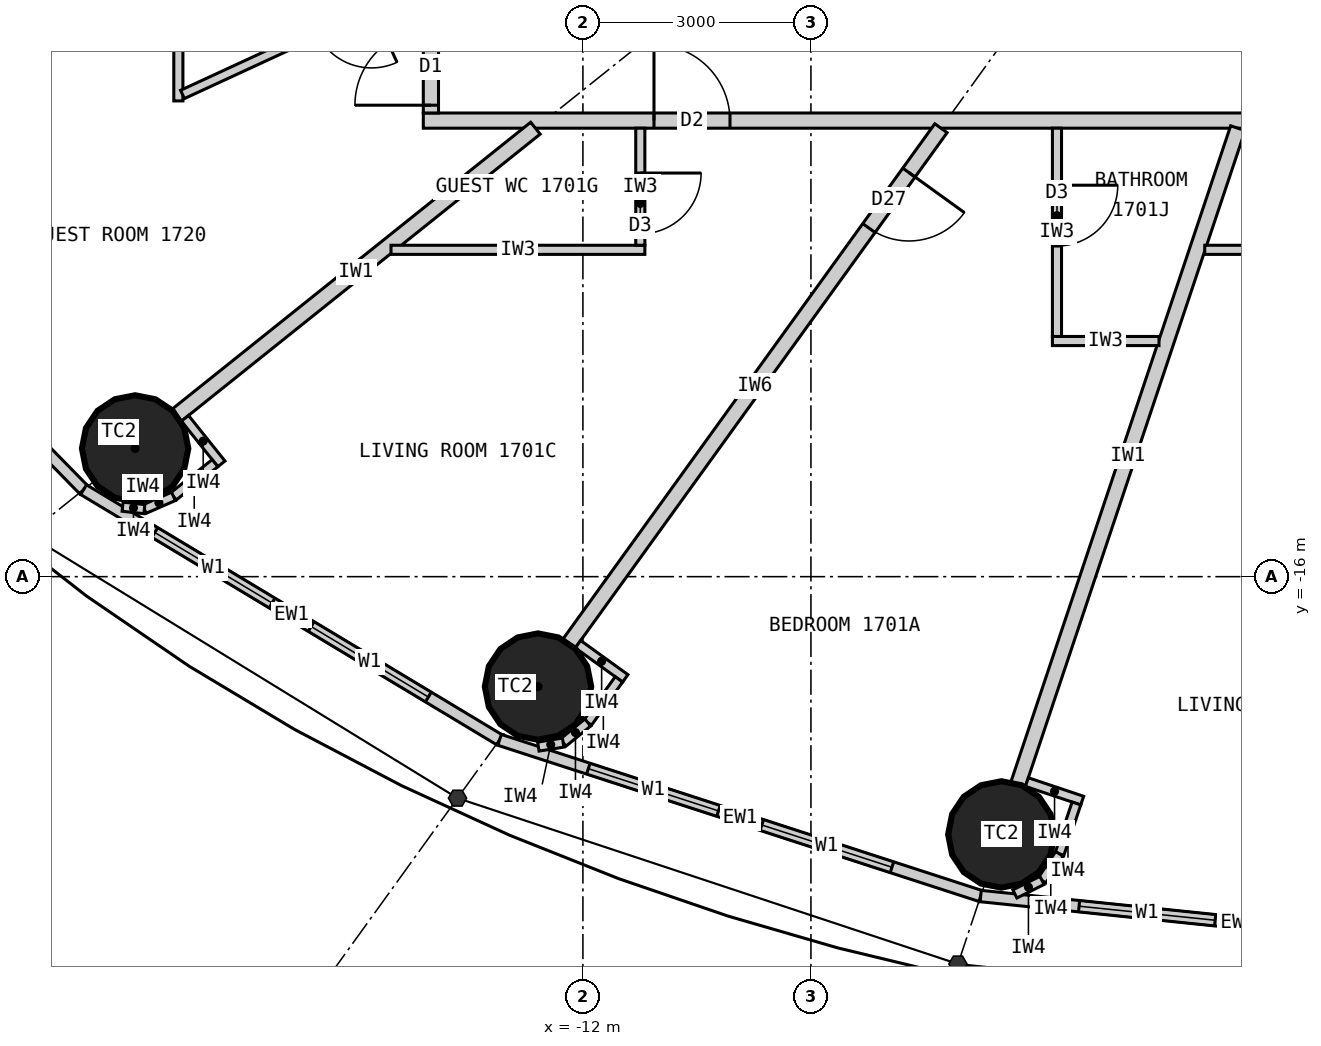
"""IFC4 building model, lengths in metres.
Left out: names, types, materials, properties, quantities, classifications, styles, units other than length and angle.
Written with IfcOpenShell. Run it as: python <this file> out.ifc"""

import sys

from ifc_helpers import new_model, si_unit, direction, frame, frame_2d, origin, origin_2d, place, context, subcontext, project, spatial, rectangle, circle, extrude, element, fill, save


model = new_model("IFC4")
c1 = context("Model", 3, precision=1e-05, world=origin(), true_north=direction((0.0, 1.0)))
c2 = subcontext(c1, "Body", "Model", "MODEL_VIEW")
j1 = project(units=[si_unit("LENGTHUNIT", "METRE"), si_unit("PLANEANGLEUNIT", "RADIAN")], contexts=[c1])
p1 = place(None, origin())
s1 = spatial("IfcSite", under=j1, at=p1, CompositionType="ELEMENT")
p2 = place(p1, origin())
s2 = spatial("IfcBuilding", under=s1, at=p2, CompositionType="ELEMENT")
p3 = place(p2, frame((0.0, 0.0, 70.5)))
s3 = spatial("IfcBuildingStorey", under=s2, at=p3, CompositionType="ELEMENT", Elevation=70.5)
for number, where, z_axis, x_axis in (
    (1, (-17.892, -14.313, 0.0), (0.0, 0.0, 1.0), (1.0, 0.0, 0.0)),
    (2, (-12.591, -17.447, 0.0), (0.0, 0.0, 1.0), (1.0, 0.0, 0.0)),
    (3, (-6.495, -19.391, 0.0), (0.0, 0.0, 1.0), (1.0, 0.0, 0.0)),
):
    element("IfcColumn", number, at=place(p3, frame(where, z_axis=z_axis, x_axis=x_axis)), inside=s3, PredefinedType="COLUMN", context=c2, shape_type="SweptSolid", body=[
        extrude(circle(Radius=0.7, at=origin_2d()), origin(), (0.0, 0.0, 1.0), 3.3),
    ])
p4 = place(p3, frame((-22.803, -10.532, 0.0), z_axis=(0.0, 0.0, 1.0), x_axis=(0.699602905915, -0.714531856557, 0.0)))
e4 = element("IfcWall", 4, at=p4, inside=s3, PredefinedType="ELEMENTEDWALL", context=c2, shape_type="SweptSolid", body=[
    extrude(rectangle(XDim=6.051, YDim=0.15, at=frame_2d((3.025, 0.0))), origin(), (0.0, 0.0, 1.0), 3.12),
])
p5 = place(p4, frame((0.926, 0.0, 0.9)))
e5 = element("IfcOpeningElement", 5, at=p5, cuts=e4, PredefinedType="OPENING", context=c2, shape_type="SweptSolid", body=[
    extrude(rectangle(XDim=1.8, YDim=1.9, at=frame_2d((0.9, 0.95))), frame((0.0, 0.085, 0.0), z_axis=(0.0, -1.0, 0.0), x_axis=(1.0, 0.0, 0.0)), (0.0, 0.0, 1.0), 0.17),
])
p6 = place(p4, frame((3.325, 0.0, 0.9)))
e6 = element("IfcOpeningElement", 6, at=p6, cuts=e4, PredefinedType="OPENING", context=c2, shape_type="SweptSolid", body=[
    extrude(rectangle(XDim=1.8, YDim=1.9, at=frame_2d((0.9, 0.95))), frame((0.0, 0.085, 0.0), z_axis=(0.0, -1.0, 0.0), x_axis=(1.0, 0.0, 0.0)), (0.0, 0.0, 1.0), 0.17),
])
p7 = place(p3, frame((-18.57, -14.856, 0.0), z_axis=(0.0, 0.0, 1.0), x_axis=(0.856983180864, -0.515344377787, 0.0)))
e7 = element("IfcWall", 7, at=p7, inside=s3, PredefinedType="ELEMENTEDWALL", context=c2, shape_type="SweptSolid", body=[
    extrude(rectangle(XDim=6.386, YDim=0.15, at=frame_2d((3.193, 0.0))), origin(), (0.0, 0.0, 1.0), 3.12),
])
p8 = place(p7, frame((1.093, 0.0, 0.9)))
e8 = element("IfcOpeningElement", 8, at=p8, cuts=e7, PredefinedType="OPENING", context=c2, shape_type="SweptSolid", body=[
    extrude(rectangle(XDim=1.8, YDim=1.9, at=frame_2d((0.9, 0.95))), frame((0.0, 0.085, 0.0), z_axis=(0.0, -1.0, 0.0), x_axis=(1.0, 0.0, 0.0)), (0.0, 0.0, 1.0), 0.17),
])
p9 = place(p7, frame((3.493, 0.0, 0.9)))
e9 = element("IfcOpeningElement", 9, at=p9, cuts=e7, PredefinedType="OPENING", context=c2, shape_type="SweptSolid", body=[
    extrude(rectangle(XDim=1.8, YDim=1.9, at=frame_2d((0.9, 0.95))), frame((0.0, 0.085, 0.0), z_axis=(0.0, -1.0, 0.0), x_axis=(1.0, 0.0, 0.0)), (0.0, 0.0, 1.0), 0.17),
])
p10 = place(p3, frame((-13.096, -18.147, 0.0), z_axis=(0.0, 0.0, 1.0), x_axis=(0.951137534625, -0.308767534285, 0.0)))
e10 = element("IfcWall", 10, at=p10, inside=s3, PredefinedType="ELEMENTEDWALL", context=c2, shape_type="SweptSolid", body=[
    extrude(rectangle(XDim=6.655, YDim=0.15, at=frame_2d((3.328, 0.0))), origin(), (0.0, 0.0, 1.0), 3.12),
])
p11 = place(p10, frame((1.228, 0.0, 0.9)))
e11 = element("IfcOpeningElement", 11, at=p11, cuts=e10, PredefinedType="OPENING", context=c2, shape_type="SweptSolid", body=[
    extrude(rectangle(XDim=1.8, YDim=1.9, at=frame_2d((0.9, 0.95))), frame((0.0, 0.085, 0.0), z_axis=(0.0, -1.0, 0.0), x_axis=(1.0, 0.0, 0.0)), (0.0, 0.0, 1.0), 0.17),
])
p12 = place(p10, frame((3.628, 0.0, 0.9)))
e12 = element("IfcOpeningElement", 12, at=p12, cuts=e10, PredefinedType="OPENING", context=c2, shape_type="SweptSolid", body=[
    extrude(rectangle(XDim=1.8, YDim=1.9, at=frame_2d((0.9, 0.95))), frame((0.0, 0.085, 0.0), z_axis=(0.0, -1.0, 0.0), x_axis=(1.0, 0.0, 0.0)), (0.0, 0.0, 1.0), 0.17),
])
p13 = place(p3, frame((-6.766, -20.202, 0.0), z_axis=(0.0, 0.0, 1.0), x_axis=(0.994721394369, -0.102612609291, 0.0)))
e13 = element("IfcWall", 13, at=p13, inside=s3, PredefinedType="ELEMENTEDWALL", context=c2, shape_type="SweptSolid", body=[
    extrude(rectangle(XDim=6.802, YDim=0.15, at=frame_2d((3.401, 0.0))), origin(), (0.0, 0.0, 1.0), 3.12),
])
p14 = place(p13, frame((1.301, 0.0, 0.9)))
e14 = element("IfcOpeningElement", 14, at=p14, cuts=e13, PredefinedType="OPENING", context=c2, shape_type="SweptSolid", body=[
    extrude(rectangle(XDim=1.8, YDim=1.9, at=frame_2d((0.9, 0.95))), frame((0.0, 0.085, 0.0), z_axis=(0.0, -1.0, 0.0), x_axis=(1.0, 0.0, 0.0)), (0.0, 0.0, 1.0), 0.17),
])
p15 = place(p13, frame((3.701, 0.0, 0.9)))
e15 = element("IfcOpeningElement", 15, at=p15, cuts=e13, PredefinedType="OPENING", context=c2, shape_type="SweptSolid", body=[
    extrude(rectangle(XDim=1.8, YDim=1.9, at=frame_2d((0.9, 0.95))), frame((0.0, 0.085, 0.0), z_axis=(0.0, -1.0, 0.0), x_axis=(1.0, 0.0, 0.0)), (0.0, 0.0, 1.0), 0.17),
])
p16 = place(p3, frame((14.1, -10.0, 0.0), z_axis=(0.0, 0.0, 1.0), x_axis=(-1.0, 0.0, 0.0)))
e16 = element("IfcWall", 16, at=p16, inside=s3, PredefinedType="PARTITIONING", context=c2, shape_type="SweptSolid", body=[
    extrude(rectangle(XDim=28.2, YDim=0.2, at=frame_2d((14.1, 0.0))), origin(), (0.0, 0.0, 1.0), 3.12),
])
p17 = place(p16, frame((24.165, 0.0, 0.0)))
e17 = element("IfcOpeningElement", 17, at=p17, cuts=e16, PredefinedType="OPENING", context=c2, shape_type="SweptSolid", body=[
    extrude(rectangle(XDim=1.0, YDim=2.2, at=frame_2d((0.5, 1.1))), frame((0.0, 0.11, 0.0), z_axis=(0.0, -1.0, 0.0), x_axis=(1.0, 0.0, 0.0)), (0.0, 0.0, 1.0), 0.22),
])
p18 = place(p16, frame((14.923, 0.0, 0.0)))
e18 = element("IfcOpeningElement", 18, at=p18, cuts=e16, PredefinedType="OPENING", context=c2, shape_type="SweptSolid", body=[
    extrude(rectangle(XDim=1.0, YDim=2.2, at=frame_2d((0.5, 1.1))), frame((0.0, 0.11, 0.0), z_axis=(0.0, -1.0, 0.0), x_axis=(1.0, 0.0, 0.0)), (0.0, 0.0, 1.0), 0.22),
])
p19 = place(p16, frame((3.035, 0.0, 0.0)))
e19 = element("IfcOpeningElement", 19, at=p19, cuts=e16, PredefinedType="OPENING", context=c2, shape_type="SweptSolid", body=[
    extrude(rectangle(XDim=1.0, YDim=2.2, at=frame_2d((0.5, 1.1))), frame((0.0, 0.11, 0.0), z_axis=(0.0, -1.0, 0.0), x_axis=(1.0, 0.0, 0.0)), (0.0, 0.0, 1.0), 0.22),
])
p20 = place(p3, frame((-14.1, -6.512, 0.0), z_axis=(0.0, 0.0, 1.0), x_axis=(-0.907832871056, -0.419332181247, 0.0)))
e20 = element("IfcWall", 20, at=p20, inside=s3, PredefinedType="PARTITIONING", context=c2, shape_type="SweptSolid", body=[
    extrude(rectangle(XDim=8.023, YDim=0.2, at=frame_2d((4.011, 0.0))), origin(), (0.0, 0.0, 1.0), 2.32),
])
p21 = place(p3, frame((-12.625, -10.1, 0.0), z_axis=(0.0, 0.0, 1.0), x_axis=(-0.780892451574, -0.624665493744, 0.0)))
e21 = element("IfcWall", 21, at=p21, inside=s3, PredefinedType="PARTITIONING", context=c2, shape_type="SweptSolid", body=[
    extrude(rectangle(XDim=6.045, YDim=0.2, at=frame_2d((3.022, 0.0))), origin(), (0.0, 0.0, 1.0), 2.32),
])
p22 = place(p3, frame((-7.289, -10.1, 0.0), z_axis=(0.0, 0.0, 1.0), x_axis=(-0.585198353053, -0.810890182197, 0.0)))
e22 = element("IfcWall", 22, at=p22, inside=s3, PredefinedType="PARTITIONING", context=c2, shape_type="SweptSolid", body=[
    extrude(rectangle(XDim=8.36, YDim=0.2, at=frame_2d((4.18, 0.0))), origin(), (0.0, 0.0, 1.0), 2.32),
])
p23 = place(p22, frame((0.72, 0.0, 0.0)))
e23 = element("IfcOpeningElement", 23, at=p23, cuts=e22, PredefinedType="OPENING", context=c2, shape_type="SweptSolid", body=[
    extrude(rectangle(XDim=0.9, YDim=2.1, at=frame_2d((0.45, 1.05))), frame((0.0, 0.11, 0.0), z_axis=(0.0, -1.0, 0.0), x_axis=(1.0, 0.0, 0.0)), (0.0, 0.0, 1.0), 0.22),
])
p24 = place(p3, frame((-3.383, -10.1, 0.0), z_axis=(0.0, 0.0, 1.0), x_axis=(-0.31759592231, -0.948226149256, 0.0)))
e24 = element("IfcWall", 24, at=p24, inside=s3, PredefinedType="PARTITIONING", context=c2, shape_type="SweptSolid", body=[
    extrude(rectangle(XDim=9.098, YDim=0.2, at=frame_2d((4.549, 0.0))), origin(), (0.0, 0.0, 1.0), 2.32),
])
p25 = place(p3, frame((-14.525, -11.7, 0.0), z_axis=(0.0, 0.0, 1.0), x_axis=(1.0, 0.0, 0.0)))
e25 = element("IfcWall", 25, at=p25, inside=s3, PredefinedType="PARTITIONING", context=c2, shape_type="SweptSolid", body=[
    extrude(rectangle(XDim=3.34, YDim=0.12, at=frame_2d((1.67, 0.0))), origin(), (0.0, 0.0, 1.0), 3.12),
])
p26 = place(p3, frame((-11.245, -10.1, 0.0), z_axis=(0.0, 0.0, 1.0), x_axis=(0.0, -1.0, 0.0)))
e26 = element("IfcWall", 26, at=p26, inside=s3, PredefinedType="PARTITIONING", context=c2, shape_type="SweptSolid", body=[
    extrude(rectangle(XDim=1.54, YDim=0.12, at=frame_2d((0.77, 0.0))), origin(), (0.0, 0.0, 1.0), 3.12),
])
p27 = place(p26, frame((0.59, 0.0, 0.0)))
e27 = element("IfcOpeningElement", 27, at=p27, cuts=e26, PredefinedType="OPENING", context=c2, shape_type="SweptSolid", body=[
    extrude(rectangle(XDim=0.8, YDim=2.1, at=frame_2d((0.4, 1.05))), frame((0.0, 0.07, 0.0), z_axis=(0.0, -1.0, 0.0), x_axis=(1.0, 0.0, 0.0)), (0.0, 0.0, 1.0), 0.14),
])
p28 = place(p3, frame((-4.421, -12.9, 0.0), z_axis=(0.0, 0.0, 1.0), x_axis=(-1.0, 0.0, 0.0)))
e28 = element("IfcWall", 28, at=p28, inside=s3, PredefinedType="PARTITIONING", context=c2, shape_type="SweptSolid", body=[
    extrude(rectangle(XDim=1.402, YDim=0.12, at=frame_2d((0.701, 0.0))), origin(), (0.0, 0.0, 1.0), 3.12),
])
p29 = place(p3, frame((-5.763, -10.1, 0.0), z_axis=(0.0, 0.0, 1.0), x_axis=(0.0, -1.0, 0.0)))
e29 = element("IfcWall", 29, at=p29, inside=s3, PredefinedType="PARTITIONING", context=c2, shape_type="SweptSolid", body=[
    extrude(rectangle(XDim=2.74, YDim=0.12, at=frame_2d((1.37, 0.0))), origin(), (0.0, 0.0, 1.0), 3.12),
])
p30 = place(p29, frame((0.75, 0.0, 0.0)))
e30 = element("IfcOpeningElement", 30, at=p30, cuts=e29, PredefinedType="OPENING", context=c2, shape_type="SweptSolid", body=[
    extrude(rectangle(XDim=0.8, YDim=2.1, at=frame_2d((0.4, 1.05))), frame((0.0, 0.07, 0.0), z_axis=(0.0, -1.0, 0.0), x_axis=(1.0, 0.0, 0.0)), (0.0, 0.0, 1.0), 0.14),
])
p31 = place(p3, frame((-3.819, -11.7, 0.0), z_axis=(0.0, 0.0, 1.0), x_axis=(1.0, 0.0, 0.0)))
e31 = element("IfcWall", 31, at=p31, inside=s3, PredefinedType="PARTITIONING", context=c2, shape_type="SweptSolid", body=[
    extrude(rectangle(XDim=1.876, YDim=0.12, at=frame_2d((0.938, 0.0))), origin(), (0.0, 0.0, 1.0), 3.12),
])
p32 = place(p3, frame((-17.323, -8.101, 0.0), z_axis=(0.0, 0.0, 1.0), x_axis=(0.0, -1.0, 0.0)))
e32 = element("IfcWall", 32, at=p32, inside=s3, PredefinedType="PARTITIONING", context=c2, shape_type="SweptSolid", body=[
    extrude(rectangle(XDim=1.64, YDim=0.12, at=frame_2d((0.82, 0.0))), origin(), (0.0, 0.0, 1.0), 3.12),
])
p33 = place(p3, frame((-14.1, -8.193, 0.0), z_axis=(0.0, 0.0, 1.0), x_axis=(-0.907836493557, -0.419324338628, 0.0)))
e33 = element("IfcWall", 33, at=p33, inside=s3, PredefinedType="PARTITIONING", context=c2, shape_type="SweptSolid", body=[
    extrude(rectangle(XDim=3.49, YDim=0.12, at=frame_2d((1.745, 0.0))), origin(), (0.0, 0.0, 1.0), 3.12),
])
p34 = place(p33, frame((0.75, 0.0, 0.0)))
e34 = element("IfcOpeningElement", 34, at=p34, cuts=e33, PredefinedType="OPENING", context=c2, shape_type="SweptSolid", body=[
    extrude(rectangle(XDim=0.8, YDim=2.1, at=frame_2d((0.4, 1.05))), frame((0.0, 0.07, 0.0), z_axis=(0.0, -1.0, 0.0), x_axis=(1.0, 0.0, 0.0)), (0.0, 0.0, 1.0), 0.14),
])
p35 = place(p3, frame((-14.0, -4.772, 0.0), z_axis=(0.0, 0.0, 1.0), x_axis=(0.0, -1.0, 0.0)))
e35 = element("IfcWall", 35, at=p35, inside=s3, PredefinedType="PARTITIONING", context=c2, shape_type="SweptSolid", body=[
    extrude(rectangle(XDim=5.127, YDim=0.2, at=frame_2d((2.564, 0.0))), origin(), (0.0, 0.0, 1.0), 3.12),
])
p36 = place(p35, frame((4.025, 0.0, 0.0)))
e36 = element("IfcOpeningElement", 36, at=p36, cuts=e35, PredefinedType="OPENING", context=c2, shape_type="SweptSolid", body=[
    extrude(rectangle(XDim=1.0, YDim=2.2, at=frame_2d((0.5, 1.1))), frame((0.0, 0.11, 0.0), z_axis=(0.0, -1.0, 0.0), x_axis=(1.0, 0.0, 0.0)), (0.0, 0.0, 1.0), 0.22),
])
p37 = place(p3, frame((-17.236, -13.917, 0.0), z_axis=(0.0, 0.0, 1.0), x_axis=(0.624695047554, -0.780868809443, 0.0)))
e37 = element("IfcWall", 37, at=p37, inside=s3, PredefinedType="PARTITIONING", context=c2, shape_type="SweptSolid", body=[
    extrude(rectangle(XDim=0.768, YDim=0.12, at=frame_2d((0.384, 0.0))), origin(), (0.0, 0.0, 1.0), 3.12),
])
p38 = place(p3, frame((-16.841, -14.507, 0.0), z_axis=(0.0, 0.0, 1.0), x_axis=(-0.780902834923, -0.62465251333, 0.0)))
e38 = element("IfcWall", 38, at=p38, inside=s3, PredefinedType="PARTITIONING", context=c2, shape_type="SweptSolid", body=[
    extrude(rectangle(XDim=0.7, YDim=0.12, at=frame_2d((0.35, 0.0))), origin(), (0.0, 0.0, 1.0), 3.12),
])
p39 = place(p3, frame((-17.387, -14.944, 0.0), z_axis=(0.0, 0.0, 1.0), x_axis=(-0.916036698064, -0.401094462441, 0.0)))
e39 = element("IfcWall", 39, at=p39, inside=s3, PredefinedType="PARTITIONING", context=c2, shape_type="SweptSolid", body=[
    extrude(rectangle(XDim=0.418, YDim=0.12, at=frame_2d((0.209, 0.0))), origin(), (0.0, 0.0, 1.0), 3.12),
])
p40 = place(p3, frame((-17.77, -15.112, 0.0), z_axis=(0.0, 0.0, 1.0), x_axis=(-0.993904401174, 0.110245368731, 0.0)))
e40 = element("IfcWall", 40, at=p40, inside=s3, PredefinedType="PARTITIONING", context=c2, shape_type="SweptSolid", body=[
    extrude(rectangle(XDim=0.288, YDim=0.12, at=frame_2d((0.144, 0.0))), origin(), (0.0, 0.0, 1.0), 3.12),
])
p41 = place(p3, frame((-12.065, -16.889, 0.0), z_axis=(0.0, 0.0, 1.0), x_axis=(0.810821798253, -0.585293098778, 0.0)))
e41 = element("IfcWall", 41, at=p41, inside=s3, PredefinedType="PARTITIONING", context=c2, shape_type="SweptSolid", body=[
    extrude(rectangle(XDim=0.768, YDim=0.12, at=frame_2d((0.384, 0.0))), origin(), (0.0, 0.0, 1.0), 3.12),
])
p42 = place(p3, frame((-11.526, -17.351, 0.0), z_axis=(0.0, 0.0, 1.0), x_axis=(-0.585223113993, -0.810872312296, 0.0)))
e42 = element("IfcWall", 42, at=p42, inside=s3, PredefinedType="PARTITIONING", context=c2, shape_type="SweptSolid", body=[
    extrude(rectangle(XDim=0.7, YDim=0.12, at=frame_2d((0.35, 0.0))), origin(), (0.0, 0.0, 1.0), 3.12),
])
p43 = place(p3, frame((-11.936, -17.919, 0.0), z_axis=(0.0, 0.0, 1.0), x_axis=(-0.775023088441, -0.631932917629, 0.0)))
e43 = element("IfcWall", 43, at=p43, inside=s3, PredefinedType="PARTITIONING", context=c2, shape_type="SweptSolid", body=[
    extrude(rectangle(XDim=0.418, YDim=0.12, at=frame_2d((0.209, 0.0))), origin(), (0.0, 0.0, 1.0), 3.12),
])
p44 = place(p3, frame((-12.26, -18.183, 0.0), z_axis=(0.0, 0.0, 1.0), x_axis=(-0.987218661664, -0.159371622511, 0.0)))
e44 = element("IfcWall", 44, at=p44, inside=s3, PredefinedType="PARTITIONING", context=c2, shape_type="SweptSolid", body=[
    extrude(rectangle(XDim=0.331, YDim=0.12, at=frame_2d((0.166, 0.0))), origin(), (0.0, 0.0, 1.0), 3.12),
])
p45 = place(p3, frame((-6.159, -18.702, 0.0), z_axis=(0.0, 0.0, 1.0), x_axis=(0.948173154049, -0.31775410295, 0.0)))
e45 = element("IfcWall", 45, at=p45, inside=s3, PredefinedType="PARTITIONING", context=c2, shape_type="SweptSolid", body=[
    extrude(rectangle(XDim=0.768, YDim=0.12, at=frame_2d((0.384, 0.0))), origin(), (0.0, 0.0, 1.0), 3.12),
])
p46 = place(p3, frame((-5.507, -18.984, 0.0), z_axis=(0.0, 0.0, 1.0), x_axis=(-0.317692050622, -0.948193946918, 0.0)))
e46 = element("IfcWall", 46, at=p46, inside=s3, PredefinedType="PARTITIONING", context=c2, shape_type="SweptSolid", body=[
    extrude(rectangle(XDim=0.7, YDim=0.12, at=frame_2d((0.35, 0.0))), origin(), (0.0, 0.0, 1.0), 3.12),
])
p47 = place(p3, frame((-5.729, -19.648, 0.0), z_axis=(0.0, 0.0, 1.0), x_axis=(-0.552135764955, -0.833754218615, 0.0)))
e47 = element("IfcWall", 47, at=p47, inside=s3, PredefinedType="PARTITIONING", context=c2, shape_type="SweptSolid", body=[
    extrude(rectangle(XDim=0.418, YDim=0.12, at=frame_2d((0.209, 0.0))), origin(), (0.0, 0.0, 1.0), 3.12),
])
p48 = place(p3, frame((-5.96, -19.996, 0.0), z_axis=(0.0, 0.0, 1.0), x_axis=(-0.895160725913, -0.445743507842, 0.0)))
e48 = element("IfcWall", 48, at=p48, inside=s3, PredefinedType="PARTITIONING", context=c2, shape_type="SweptSolid", body=[
    extrude(rectangle(XDim=0.399, YDim=0.12, at=frame_2d((0.199, 0.0))), origin(), (0.0, 0.0, 1.0), 3.12),
])
p49 = place(p8, origin())
e49 = element("IfcWindow", 49, at=p49, inside=s3, PartitioningType="SINGLE_PANEL", PredefinedType="WINDOW", context=c2, shape_type="SweptSolid", body=[
    extrude(rectangle(XDim=1.8, YDim=1.9, at=frame_2d((0.9, 0.95))), frame((0.0, 0.03, 0.0), z_axis=(0.0, -1.0, 0.0), x_axis=(1.0, 0.0, 0.0)), (0.0, 0.0, 1.0), 0.06),
])
fill(e8, e49)
p50 = place(p9, origin())
e50 = element("IfcWindow", 50, at=p50, inside=s3, PartitioningType="SINGLE_PANEL", PredefinedType="WINDOW", context=c2, shape_type="SweptSolid", body=[
    extrude(rectangle(XDim=1.8, YDim=1.9, at=frame_2d((0.9, 0.95))), frame((0.0, 0.03, 0.0), z_axis=(0.0, -1.0, 0.0), x_axis=(1.0, 0.0, 0.0)), (0.0, 0.0, 1.0), 0.06),
])
fill(e9, e50)
p51 = place(p11, origin())
e51 = element("IfcWindow", 51, at=p51, inside=s3, PartitioningType="SINGLE_PANEL", PredefinedType="WINDOW", context=c2, shape_type="SweptSolid", body=[
    extrude(rectangle(XDim=1.8, YDim=1.9, at=frame_2d((0.9, 0.95))), frame((0.0, 0.03, 0.0), z_axis=(0.0, -1.0, 0.0), x_axis=(1.0, 0.0, 0.0)), (0.0, 0.0, 1.0), 0.06),
])
fill(e11, e51)
p52 = place(p12, origin())
e52 = element("IfcWindow", 52, at=p52, inside=s3, PartitioningType="SINGLE_PANEL", PredefinedType="WINDOW", context=c2, shape_type="SweptSolid", body=[
    extrude(rectangle(XDim=1.8, YDim=1.9, at=frame_2d((0.9, 0.95))), frame((0.0, 0.03, 0.0), z_axis=(0.0, -1.0, 0.0), x_axis=(1.0, 0.0, 0.0)), (0.0, 0.0, 1.0), 0.06),
])
fill(e12, e52)
p53 = place(p14, origin())
e53 = element("IfcWindow", 53, at=p53, inside=s3, PartitioningType="SINGLE_PANEL", PredefinedType="WINDOW", context=c2, shape_type="SweptSolid", body=[
    extrude(rectangle(XDim=1.8, YDim=1.9, at=frame_2d((0.9, 0.95))), frame((0.0, 0.03, 0.0), z_axis=(0.0, -1.0, 0.0), x_axis=(1.0, 0.0, 0.0)), (0.0, 0.0, 1.0), 0.06),
])
fill(e14, e53)
p54 = place(p27, origin())
e54 = element("IfcDoor", 54, at=p54, inside=s3, OperationType="SINGLE_SWING_LEFT", PredefinedType="DOOR", context=c2, shape_type="SweptSolid", body=[
    extrude(rectangle(XDim=0.8, YDim=2.1, at=frame_2d((0.4, 1.05))), frame((0.0, 0.025, 0.0), z_axis=(0.0, -1.0, 0.0), x_axis=(1.0, 0.0, 0.0)), (0.0, 0.0, 1.0), 0.05),
])
fill(e27, e54)
p55 = place(p17, origin())
e55 = element("IfcDoor", 55, at=p55, inside=s3, OperationType="SINGLE_SWING_RIGHT", PredefinedType="DOOR", context=c2, shape_type="SweptSolid", body=[
    extrude(rectangle(XDim=1.0, YDim=2.2, at=frame_2d((0.5, 1.1))), frame((0.0, 0.025, 0.0), z_axis=(0.0, -1.0, 0.0), x_axis=(1.0, 0.0, 0.0)), (0.0, 0.0, 1.0), 0.05),
])
fill(e17, e55)
p56 = place(p30, origin())
e56 = element("IfcDoor", 56, at=p56, inside=s3, OperationType="SINGLE_SWING_LEFT", PredefinedType="DOOR", context=c2, shape_type="SweptSolid", body=[
    extrude(rectangle(XDim=0.8, YDim=2.1, at=frame_2d((0.4, 1.05))), frame((0.0, 0.025, 0.0), z_axis=(0.0, -1.0, 0.0), x_axis=(1.0, 0.0, 0.0)), (0.0, 0.0, 1.0), 0.05),
])
fill(e30, e56)
p57 = place(p23, origin())
e57 = element("IfcDoor", 57, at=p57, inside=s3, OperationType="SINGLE_SWING_LEFT", PredefinedType="DOOR", context=c2, shape_type="SweptSolid", body=[
    extrude(rectangle(XDim=0.9, YDim=2.1, at=frame_2d((0.45, 1.05))), frame((0.0, 0.025, 0.0), z_axis=(0.0, -1.0, 0.0), x_axis=(1.0, 0.0, 0.0)), (0.0, 0.0, 1.0), 0.05),
])
fill(e23, e57)
p58 = place(p36, origin())
e58 = element("IfcDoor", 58, at=p58, inside=s3, OperationType="SINGLE_SWING_RIGHT", PredefinedType="DOOR", context=c2, shape_type="SweptSolid", body=[
    extrude(rectangle(XDim=1.0, YDim=2.2, at=frame_2d((0.5, 1.1))), frame((0.0, 0.025, 0.0), z_axis=(0.0, -1.0, 0.0), x_axis=(1.0, 0.0, 0.0)), (0.0, 0.0, 1.0), 0.05),
])
fill(e36, e58)
save(model, sys.argv[1])
